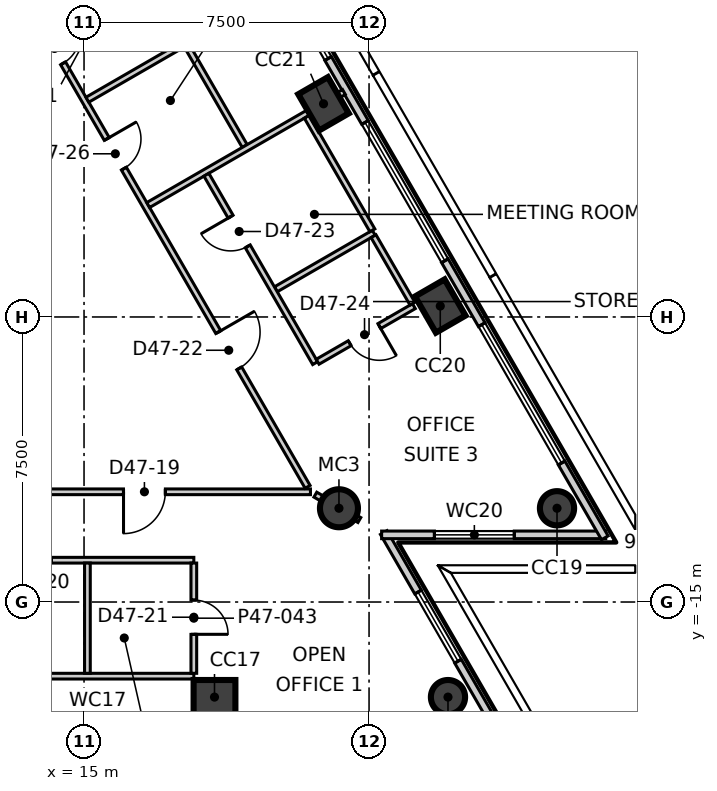
"""IFC4 building model, lengths in metres.
Left out: names, types, materials, properties, quantities, classifications, styles, units other than length and angle.
Written with IfcOpenShell. Run it as: python <this file> out.ifc"""

import sys

from ifc_helpers import new_model, si_unit, direction, frame, frame_2d, origin, origin_2d, place, context, subcontext, project, spatial, rectangle, circle, extrude, element, fill, save


model = new_model("IFC4")
c1 = context("Model", 3, precision=1e-05, world=origin(), true_north=direction((0.0, 1.0)))
c2 = subcontext(c1, "Body", "Model", "MODEL_VIEW")
j1 = project(units=[si_unit("LENGTHUNIT", "METRE"), si_unit("PLANEANGLEUNIT", "RADIAN")], contexts=[c1])
p1 = place(None, origin())
s1 = spatial("IfcSite", under=j1, at=p1, CompositionType="ELEMENT")
p2 = place(p1, origin())
s2 = spatial("IfcBuilding", under=s1, at=p2, CompositionType="ELEMENT")
p3 = place(p2, frame((0.0, 0.0, 203.3)))
s3 = spatial("IfcBuildingStorey", under=s2, at=p3, CompositionType="ELEMENT", Elevation=203.3)
p4 = place(p3, frame((18.433, -17.502, -0.3), z_axis=(0.0, 0.0, 1.0), x_axis=(1.0, 0.0, 0.0)))
e1 = element("IfcColumn", 1, at=p4, inside=s3, PredefinedType="COLUMN", context=c2, shape_type="SweptSolid", body=[
    extrude(rectangle(XDim=1.1, YDim=0.9, at=origin_2d()), origin(), (0.0, 0.0, 1.0), 4.0),
])
for number, where, z_axis, x_axis in (
    (2, (24.577, -17.502, -0.3), (0.0, 0.0, 1.0), (1.0, 0.0, 0.0)),
    (3, (27.446, -12.533, -0.3), (0.0, 0.0, 1.0), (-0.5, 0.866, 0.0)),
):
    element("IfcColumn", number, at=place(p3, frame(where, z_axis=z_axis, x_axis=x_axis)), inside=s3, PredefinedType="COLUMN", context=c2, shape_type="SweptSolid", body=[
        extrude(circle(Radius=0.45, at=origin_2d()), origin(), (0.0, 0.0, 1.0), 4.0),
    ])
for number, where, z_axis, x_axis in (
    (4, (24.374, -7.212, -0.3), (0.0, 0.0, 1.0), (-0.5, 0.866, 0.0)),
    (5, (21.302, -1.891, -0.3), (0.0, 0.0, 1.0), (-0.5, 0.866, 0.0)),
):
    element("IfcColumn", number, at=place(p3, frame(where, z_axis=z_axis, x_axis=x_axis)), inside=s3, PredefinedType="COLUMN", context=c2, shape_type="SweptSolid", body=[
        extrude(rectangle(XDim=1.1, YDim=0.9, at=origin_2d()), origin(), (0.0, 0.0, 1.0), 4.0),
    ])
p5 = place(p3, frame((21.708, -12.533, -0.3), z_axis=(0.0, 0.0, 1.0), x_axis=(1.0, 0.0, 0.0)))
e6 = element("IfcColumn", 6, at=p5, inside=s3, PredefinedType="COLUMN", context=c2, shape_type="SweptSolid", body=[
    extrude(circle(Radius=0.5, at=origin_2d()), origin(), (0.0, 0.0, 1.0), 4.0),
])
p6 = place(p3, frame((25.835, -18.28, 0.0), z_axis=(0.0, 0.0, 1.0), x_axis=(-0.499989993172, 0.866031181152, 0.0)))
e7 = element("IfcWall", 7, at=p6, inside=s3, PredefinedType="ELEMENTEDWALL", context=c2, shape_type="SweptSolid", body=[
    extrude(rectangle(XDim=5.898, YDim=0.2, at=frame_2d((2.949, 0.0))), origin(), (0.0, 0.0, 1.0), 3.7),
])
p7 = place(p6, frame((1.99, 0.0, 0.9)))
e8 = element("IfcOpeningElement", 8, at=p7, cuts=e7, PredefinedType="OPENING", context=c2, shape_type="SweptSolid", body=[
    extrude(rectangle(XDim=2.1, YDim=2.5, at=frame_2d((1.05, 1.25))), frame((0.0, 0.11, 0.0), z_axis=(0.0, -1.0, 0.0), x_axis=(1.0, 0.0, 0.0)), (0.0, 0.0, 1.0), 0.22),
])
p8 = place(p3, frame((22.831, -13.233, 0.0), z_axis=(0.0, 0.0, 1.0), x_axis=(1.0, 0.0, 0.0)))
e9 = element("IfcWall", 9, at=p8, inside=s3, PredefinedType="ELEMENTEDWALL", context=c2, shape_type="SweptSolid", body=[
    extrude(rectangle(XDim=5.898, YDim=0.2, at=frame_2d((2.949, 0.0))), origin(), (0.0, 0.0, 1.0), 3.7),
])
p9 = place(p8, frame((1.39, 0.0, 0.9)))
e10 = element("IfcOpeningElement", 10, at=p9, cuts=e9, PredefinedType="OPENING", context=c2, shape_type="SweptSolid", body=[
    extrude(rectangle(XDim=2.1, YDim=2.5, at=frame_2d((1.05, 1.25))), frame((0.0, 0.11, 0.0), z_axis=(0.0, -1.0, 0.0), x_axis=(1.0, 0.0, 0.0)), (0.0, 0.0, 1.0), 0.22),
])
p10 = place(p3, frame((28.704, -13.311, 0.0), z_axis=(0.0, 0.0, 1.0), x_axis=(-0.500010281129, 0.866019467891, 0.0)))
e11 = element("IfcWall", 11, at=p10, inside=s3, PredefinedType="ELEMENTEDWALL", context=c2, shape_type="SweptSolid", body=[
    extrude(rectangle(XDim=51.739, YDim=0.2, at=frame_2d((25.87, 0.0))), origin(), (0.0, 0.0, 1.0), 3.7),
])
p11 = place(p10, frame((2.275, 0.0, 0.9)))
e12 = element("IfcOpeningElement", 12, at=p11, cuts=e11, PredefinedType="OPENING", context=c2, shape_type="SweptSolid", body=[
    extrude(rectangle(XDim=4.2, YDim=2.5, at=frame_2d((2.1, 1.25))), frame((0.0, 0.11, 0.0), z_axis=(0.0, -1.0, 0.0), x_axis=(1.0, 0.0, 0.0)), (0.0, 0.0, 1.0), 0.22),
])
p12 = place(p10, frame((8.419, 0.0, 0.9)))
e13 = element("IfcOpeningElement", 13, at=p12, cuts=e11, PredefinedType="OPENING", context=c2, shape_type="SweptSolid", body=[
    extrude(rectangle(XDim=4.2, YDim=2.5, at=frame_2d((2.1, 1.25))), frame((0.0, 0.11, 0.0), z_axis=(0.0, -1.0, 0.0), x_axis=(1.0, 0.0, 0.0)), (0.0, 0.0, 1.0), 0.22),
])
p13 = place(p10, frame((14.563, 0.0, 0.9)))
e14 = element("IfcOpeningElement", 14, at=p13, cuts=e11, PredefinedType="OPENING", context=c2, shape_type="SweptSolid", body=[
    extrude(rectangle(XDim=4.2, YDim=2.5, at=frame_2d((2.1, 1.25))), frame((0.0, 0.11, 0.0), z_axis=(0.0, -1.0, 0.0), x_axis=(1.0, 0.0, 0.0)), (0.0, 0.0, 1.0), 0.22),
])
p14 = place(p10, frame((20.707, 0.0, 0.9)))
e15 = element("IfcOpeningElement", 15, at=p14, cuts=e11, PredefinedType="OPENING", context=c2, shape_type="SweptSolid", body=[
    extrude(rectangle(XDim=4.2, YDim=2.5, at=frame_2d((2.1, 1.25))), frame((0.0, 0.11, 0.0), z_axis=(0.0, -1.0, 0.0), x_axis=(1.0, 0.0, 0.0)), (0.0, 0.0, 1.0), 0.22),
])
p15 = place(p10, frame((26.852, 0.0, 0.9)))
e16 = element("IfcOpeningElement", 16, at=p15, cuts=e11, PredefinedType="OPENING", context=c2, shape_type="SweptSolid", body=[
    extrude(rectangle(XDim=4.2, YDim=2.5, at=frame_2d((2.1, 1.25))), frame((0.0, 0.11, 0.0), z_axis=(0.0, -1.0, 0.0), x_axis=(1.0, 0.0, 0.0)), (0.0, 0.0, 1.0), 0.22),
])
p16 = place(p10, frame((32.996, 0.0, 0.9)))
e17 = element("IfcOpeningElement", 17, at=p16, cuts=e11, PredefinedType="OPENING", context=c2, shape_type="SweptSolid", body=[
    extrude(rectangle(XDim=4.2, YDim=2.5, at=frame_2d((2.1, 1.25))), frame((0.0, 0.11, 0.0), z_axis=(0.0, -1.0, 0.0), x_axis=(1.0, 0.0, 0.0)), (0.0, 0.0, 1.0), 0.22),
])
p17 = place(p10, frame((39.14, 0.0, 0.9)))
e18 = element("IfcOpeningElement", 18, at=p17, cuts=e11, PredefinedType="OPENING", context=c2, shape_type="SweptSolid", body=[
    extrude(rectangle(XDim=4.2, YDim=2.5, at=frame_2d((2.1, 1.25))), frame((0.0, 0.11, 0.0), z_axis=(0.0, -1.0, 0.0), x_axis=(1.0, 0.0, 0.0)), (0.0, 0.0, 1.0), 0.22),
])
p18 = place(p10, frame((45.284, 0.0, 0.9)))
e19 = element("IfcOpeningElement", 19, at=p18, cuts=e11, PredefinedType="OPENING", context=c2, shape_type="SweptSolid", body=[
    extrude(rectangle(XDim=4.2, YDim=2.5, at=frame_2d((2.1, 1.25))), frame((0.0, 0.11, 0.0), z_axis=(0.0, -1.0, 0.0), x_axis=(1.0, 0.0, 0.0)), (0.0, 0.0, 1.0), 0.22),
])
p19 = place(p3, frame((-20.808, -12.1, 0.0), z_axis=(0.0, 0.0, 1.0), x_axis=(1.0, 0.0, 0.0)))
e20 = element("IfcWall", 20, at=p19, inside=s3, PredefinedType="PARTITIONING", context=c2, shape_type="SweptSolid", body=[
    extrude(rectangle(XDim=41.766, YDim=0.15, at=frame_2d((20.883, 0.0))), origin(), (0.0, 0.0, 1.0), 3.7),
])
p20 = place(p19, frame((3.6, 0.0, 0.0)))
e21 = element("IfcOpeningElement", 21, at=p20, cuts=e20, PredefinedType="OPENING", context=c2, shape_type="SweptSolid", body=[
    extrude(rectangle(XDim=1.1, YDim=2.1, at=frame_2d((0.55, 1.05))), frame((0.0, 0.085, 0.0), z_axis=(0.0, -1.0, 0.0), x_axis=(1.0, 0.0, 0.0)), (0.0, 0.0, 1.0), 0.17),
])
p21 = place(p19, frame((17.07, 0.0, 0.0)))
e22 = element("IfcOpeningElement", 22, at=p21, cuts=e20, PredefinedType="OPENING", context=c2, shape_type="SweptSolid", body=[
    extrude(rectangle(XDim=1.1, YDim=2.1, at=frame_2d((0.55, 1.05))), frame((0.0, 0.085, 0.0), z_axis=(0.0, -1.0, 0.0), x_axis=(1.0, 0.0, 0.0)), (0.0, 0.0, 1.0), 0.17),
])
p22 = place(p19, frame((9.87, 0.0, 0.0)))
e23 = element("IfcOpeningElement", 23, at=p22, cuts=e20, PredefinedType="OPENING", context=c2, shape_type="SweptSolid", body=[
    extrude(rectangle(XDim=0.9, YDim=2.1, at=frame_2d((0.45, 1.05))), frame((0.0, 0.085, 0.0), z_axis=(0.0, -1.0, 0.0), x_axis=(1.0, 0.0, 0.0)), (0.0, 0.0, 1.0), 0.17),
])
p23 = place(p19, frame((12.87, 0.0, 0.0)))
e24 = element("IfcOpeningElement", 24, at=p23, cuts=e20, PredefinedType="OPENING", context=c2, shape_type="SweptSolid", body=[
    extrude(rectangle(XDim=0.9, YDim=2.1, at=frame_2d((0.45, 1.05))), frame((0.0, 0.085, 0.0), z_axis=(0.0, -1.0, 0.0), x_axis=(1.0, 0.0, 0.0)), (0.0, 0.0, 1.0), 0.17),
])
p24 = place(p19, frame((27.658, 0.0, 0.0)))
e25 = element("IfcOpeningElement", 25, at=p24, cuts=e20, PredefinedType="OPENING", context=c2, shape_type="SweptSolid", body=[
    extrude(rectangle(XDim=1.0, YDim=2.1, at=frame_2d((0.5, 1.05))), frame((0.0, 0.085, 0.0), z_axis=(0.0, -1.0, 0.0), x_axis=(1.0, 0.0, 0.0)), (0.0, 0.0, 1.0), 0.17),
])
p25 = place(p19, frame((21.558, 0.0, 0.0)))
e26 = element("IfcOpeningElement", 26, at=p25, cuts=e20, PredefinedType="OPENING", context=c2, shape_type="SweptSolid", body=[
    extrude(rectangle(XDim=0.9, YDim=2.1, at=frame_2d((0.45, 1.05))), frame((0.0, 0.085, 0.0), z_axis=(0.0, -1.0, 0.0), x_axis=(1.0, 0.0, 0.0)), (0.0, 0.0, 1.0), 0.17),
])
p26 = place(p19, frame((36.847, 0.0, 0.0)))
e27 = element("IfcOpeningElement", 27, at=p26, cuts=e20, PredefinedType="OPENING", context=c2, shape_type="SweptSolid", body=[
    extrude(rectangle(XDim=1.1, YDim=2.1, at=frame_2d((0.55, 1.05))), frame((0.0, 0.085, 0.0), z_axis=(0.0, -1.0, 0.0), x_axis=(1.0, 0.0, 0.0)), (0.0, 0.0, 1.0), 0.17),
])
p27 = place(p3, frame((21.087, -12.175, 0.0), z_axis=(0.0, 0.0, 1.0), x_axis=(0.8662585361, -0.499595985407, 0.0)))
e28 = element("IfcWall", 28, at=p27, inside=s3, PredefinedType="PARTITIONING", context=c2, shape_type="SweptSolid", body=[
    extrude(rectangle(XDim=1.337, YDim=0.15, at=frame_2d((0.668, 0.0))), origin(), (0.0, 0.0, 1.0), 3.2),
])
p28 = place(p3, frame((0.075, 24.07, 0.0), z_axis=(0.0, 0.0, 1.0), x_axis=(0.500006834213, -0.866021458014, 0.0)))
e29 = element("IfcWall", 29, at=p28, inside=s3, PredefinedType="PARTITIONING", context=c2, shape_type="SweptSolid", body=[
    extrude(rectangle(XDim=41.616, YDim=0.15, at=frame_2d((20.808, 0.0))), origin(), (0.0, 0.0, 1.0), 3.7),
])
p29 = place(p28, frame((36.915, 0.0, 0.0)))
e30 = element("IfcOpeningElement", 30, at=p29, cuts=e29, PredefinedType="OPENING", context=c2, shape_type="SweptSolid", body=[
    extrude(rectangle(XDim=1.1, YDim=2.1, at=frame_2d((0.55, 1.05))), frame((0.0, 0.085, 0.0), z_axis=(0.0, -1.0, 0.0), x_axis=(1.0, 0.0, 0.0)), (0.0, 0.0, 1.0), 0.17),
])
p30 = place(p28, frame((22.046, 0.0, 0.0)))
e31 = element("IfcOpeningElement", 31, at=p30, cuts=e29, PredefinedType="OPENING", context=c2, shape_type="SweptSolid", body=[
    extrude(rectangle(XDim=1.1, YDim=2.1, at=frame_2d((0.55, 1.05))), frame((0.0, 0.085, 0.0), z_axis=(0.0, -1.0, 0.0), x_axis=(1.0, 0.0, 0.0)), (0.0, 0.0, 1.0), 0.17),
])
p31 = place(p28, frame((31.046, 0.0, 0.0)))
e32 = element("IfcOpeningElement", 32, at=p31, cuts=e29, PredefinedType="OPENING", context=c2, shape_type="SweptSolid", body=[
    extrude(rectangle(XDim=0.9, YDim=2.1, at=frame_2d((0.45, 1.05))), frame((0.0, 0.085, 0.0), z_axis=(0.0, -1.0, 0.0), x_axis=(1.0, 0.0, 0.0)), (0.0, 0.0, 1.0), 0.17),
])
p32 = place(p28, frame((27.846, 0.0, 0.0)))
e33 = element("IfcOpeningElement", 33, at=p32, cuts=e29, PredefinedType="OPENING", context=c2, shape_type="SweptSolid", body=[
    extrude(rectangle(XDim=0.9, YDim=2.1, at=frame_2d((0.45, 1.05))), frame((0.0, 0.085, 0.0), z_axis=(0.0, -1.0, 0.0), x_axis=(1.0, 0.0, 0.0)), (0.0, 0.0, 1.0), 0.17),
])
p33 = place(p28, frame((24.946, 0.0, 0.0)))
e34 = element("IfcOpeningElement", 34, at=p33, cuts=e29, PredefinedType="OPENING", context=c2, shape_type="SweptSolid", body=[
    extrude(rectangle(XDim=1.0, YDim=2.1, at=frame_2d((0.5, 1.05))), frame((0.0, 0.085, 0.0), z_axis=(0.0, -1.0, 0.0), x_axis=(1.0, 0.0, 0.0)), (0.0, 0.0, 1.0), 0.17),
])
p34 = place(p28, frame((17.258, 0.0, 0.0)))
e35 = element("IfcOpeningElement", 35, at=p34, cuts=e29, PredefinedType="OPENING", context=c2, shape_type="SweptSolid", body=[
    extrude(rectangle(XDim=1.0, YDim=2.1, at=frame_2d((0.5, 1.05))), frame((0.0, 0.085, 0.0), z_axis=(0.0, -1.0, 0.0), x_axis=(1.0, 0.0, 0.0)), (0.0, 0.0, 1.0), 0.17),
])
p35 = place(p28, frame((11.114, 0.0, 0.0)))
e36 = element("IfcOpeningElement", 36, at=p35, cuts=e29, PredefinedType="OPENING", context=c2, shape_type="SweptSolid", body=[
    extrude(rectangle(XDim=1.0, YDim=2.1, at=frame_2d((0.5, 1.05))), frame((0.0, 0.085, 0.0), z_axis=(0.0, -1.0, 0.0), x_axis=(1.0, 0.0, 0.0)), (0.0, 0.0, 1.0), 0.17),
])
p36 = place(p28, frame((3.669, 0.0, 0.0)))
e37 = element("IfcOpeningElement", 37, at=p36, cuts=e29, PredefinedType="OPENING", context=c2, shape_type="SweptSolid", body=[
    extrude(rectangle(XDim=1.0, YDim=2.1, at=frame_2d((0.5, 1.05))), frame((0.0, 0.085, 0.0), z_axis=(0.0, -1.0, 0.0), x_axis=(1.0, 0.0, 0.0)), (0.0, 0.0, 1.0), 0.17),
])
p37 = place(p3, frame((14.865, 4.554, 0.0), z_axis=(0.0, 0.0, 1.0), x_axis=(0.500054279689, -0.865994063124, 0.0)))
e38 = element("IfcWall", 38, at=p37, inside=s3, PredefinedType="PARTITIONING", context=c2, shape_type="SweptSolid", body=[
    extrude(rectangle(XDim=8.725, YDim=0.15, at=frame_2d((4.363, 0.0))), origin(), (0.0, 0.0, 1.0), 3.7),
])
p38 = place(p3, frame((15.088, -1.784, 0.0), z_axis=(0.0, 0.0, 1.0), x_axis=(0.866034280428, 0.499984624887, 0.0)))
e39 = element("IfcWall", 39, at=p38, inside=s3, PredefinedType="PARTITIONING", context=c2, shape_type="SweptSolid", body=[
    extrude(rectangle(XDim=2.902, YDim=0.15, at=frame_2d((1.451, 0.0))), origin(), (0.0, 0.0, 1.0), 3.7),
])
p39 = place(p3, frame((16.688, -4.555, 0.0), z_axis=(0.0, 0.0, 1.0), x_axis=(0.866034527326, 0.49998419723, 0.0)))
e40 = element("IfcWall", 40, at=p39, inside=s3, PredefinedType="PARTITIONING", context=c2, shape_type="SweptSolid", body=[
    extrude(rectangle(XDim=5.948, YDim=0.15, at=frame_2d((2.974, 0.0))), origin(), (0.0, 0.0, 1.0), 3.7),
])
p40 = place(p3, frame((12.364, -13.9, 0.0), z_axis=(0.0, 0.0, 1.0), x_axis=(1.0, 0.0, 0.0)))
e41 = element("IfcWall", 41, at=p40, inside=s3, PredefinedType="PARTITIONING", context=c2, shape_type="SweptSolid", body=[
    extrude(rectangle(XDim=5.525, YDim=0.15, at=frame_2d((2.762, 0.0))), origin(), (0.0, 0.0, 1.0), 3.7),
])
p41 = place(p40, frame((0.875, 0.0, 0.0)))
e42 = element("IfcOpeningElement", 42, at=p41, cuts=e41, PredefinedType="OPENING", context=c2, shape_type="SweptSolid", body=[
    extrude(rectangle(XDim=0.9, YDim=2.1, at=frame_2d((0.45, 1.05))), frame((0.0, 0.085, 0.0), z_axis=(0.0, -1.0, 0.0), x_axis=(1.0, 0.0, 0.0)), (0.0, 0.0, 1.0), 0.17),
])
p42 = place(p3, frame((12.364, -16.951, 0.0), z_axis=(0.0, 0.0, 1.0), x_axis=(1.0, 0.0, 0.0)))
e43 = element("IfcWall", 43, at=p42, inside=s3, PredefinedType="PARTITIONING", context=c2, shape_type="SweptSolid", body=[
    extrude(rectangle(XDim=5.525, YDim=0.15, at=frame_2d((2.762, 0.0))), origin(), (0.0, 0.0, 1.0), 3.7),
])
p43 = place(p3, frame((17.889, -16.876, 0.0), z_axis=(0.0, 0.0, 1.0), x_axis=(0.0, 1.0, 0.0)))
e44 = element("IfcWall", 44, at=p43, inside=s3, PredefinedType="PARTITIONING", context=c2, shape_type="SweptSolid", body=[
    extrude(rectangle(XDim=2.901, YDim=0.15, at=frame_2d((1.45, 0.0))), origin(), (0.0, 0.0, 1.0), 3.7),
])
p44 = place(p43, frame((1.026, 0.0, 0.0)))
e45 = element("IfcOpeningElement", 45, at=p44, cuts=e44, PredefinedType="OPENING", context=c2, shape_type="SweptSolid", body=[
    extrude(rectangle(XDim=0.9, YDim=2.1, at=frame_2d((0.45, 1.05))), frame((0.0, 0.085, 0.0), z_axis=(0.0, -1.0, 0.0), x_axis=(1.0, 0.0, 0.0)), (0.0, 0.0, 1.0), 0.17),
])
p45 = place(p3, frame((15.089, -16.876, 0.0), z_axis=(0.0, 0.0, 1.0), x_axis=(0.0, 1.0, 0.0)))
e46 = element("IfcWall", 46, at=p45, inside=s3, PredefinedType="PARTITIONING", context=c2, shape_type="SweptSolid", body=[
    extrude(rectangle(XDim=2.901, YDim=0.15, at=frame_2d((1.45, 0.0))), origin(), (0.0, 0.0, 1.0), 3.7),
])
p46 = place(p3, frame((20.047, -6.772, 0.0), z_axis=(0.0, 0.0, 1.0), x_axis=(0.865987462095, 0.500065711177, 0.0)))
e47 = element("IfcWall", 47, at=p46, inside=s3, PredefinedType="PARTITIONING", context=c2, shape_type="SweptSolid", body=[
    extrude(rectangle(XDim=2.976, YDim=0.15, at=frame_2d((1.488, 0.0))), origin(), (0.0, 0.0, 1.0), 3.7),
])
p47 = place(p3, frame((20.862, -2.232, 0.0), z_axis=(0.0, 0.0, 1.0), x_axis=(0.499936846106, -0.866061862632, 0.0)))
e48 = element("IfcWall", 48, at=p47, inside=s3, PredefinedType="PARTITIONING", context=c2, shape_type="SweptSolid", body=[
    extrude(rectangle(XDim=3.45, YDim=0.15, at=frame_2d((1.725, 0.0))), origin(), (0.0, 0.0, 1.0), 3.7),
])
p48 = place(p3, frame((18.22, -3.757, 0.0), z_axis=(0.0, 0.0, 1.0), x_axis=(0.499941490393, -0.866059181686, 0.0)))
e49 = element("IfcWall", 49, at=p48, inside=s3, PredefinedType="PARTITIONING", context=c2, shape_type="SweptSolid", body=[
    extrude(rectangle(XDim=5.725, YDim=0.15, at=frame_2d((2.862, 0.0))), origin(), (0.0, 0.0, 1.0), 3.7),
])
p49 = place(p48, frame((1.275, 0.0, 0.0)))
e50 = element("IfcOpeningElement", 50, at=p49, cuts=e49, PredefinedType="OPENING", context=c2, shape_type="SweptSolid", body=[
    extrude(rectangle(XDim=0.9, YDim=2.1, at=frame_2d((0.45, 1.05))), frame((0.0, 0.085, 0.0), z_axis=(0.0, -1.0, 0.0), x_axis=(1.0, 0.0, 0.0)), (0.0, 0.0, 1.0), 0.17),
])
p50 = place(p3, frame((21.147, -8.678, 0.0), z_axis=(0.0, 0.0, 1.0), x_axis=(0.865953438489, 0.500124626836, 0.0)))
e51 = element("IfcWall", 51, at=p50, inside=s3, PredefinedType="PARTITIONING", context=c2, shape_type="SweptSolid", body=[
    extrude(rectangle(XDim=2.925, YDim=0.15, at=frame_2d((1.462, 0.0))), origin(), (0.0, 0.0, 1.0), 3.7),
])
p51 = place(p50, frame((0.975, 0.0, 0.0)))
e52 = element("IfcOpeningElement", 52, at=p51, cuts=e51, PredefinedType="OPENING", context=c2, shape_type="SweptSolid", body=[
    extrude(rectangle(XDim=0.9, YDim=2.1, at=frame_2d((0.45, 1.05))), frame((0.0, 0.085, 0.0), z_axis=(0.0, -1.0, 0.0), x_axis=(1.0, 0.0, 0.0)), (0.0, 0.0, 1.0), 0.17),
])
p52 = place(p3, frame((22.618, -5.375, 0.0), z_axis=(0.0, 0.0, 1.0), x_axis=(0.50014860279, -0.865939590923, 0.0)))
e53 = element("IfcWall", 53, at=p52, inside=s3, PredefinedType="PARTITIONING", context=c2, shape_type="SweptSolid", body=[
    extrude(rectangle(XDim=2.05, YDim=0.15, at=frame_2d((1.025, 0.0))), origin(), (0.0, 0.0, 1.0), 3.7),
])
p53 = place(p7, origin())
e54 = element("IfcWindow", 54, at=p53, inside=s3, PartitioningType="SINGLE_PANEL", PredefinedType="WINDOW", context=c2, shape_type="SweptSolid", body=[
    extrude(rectangle(XDim=2.1, YDim=2.5, at=frame_2d((1.05, 1.25))), frame((0.0, 0.03, 0.0), z_axis=(0.0, -1.0, 0.0), x_axis=(1.0, 0.0, 0.0)), (0.0, 0.0, 1.0), 0.06),
])
fill(e8, e54)
p54 = place(p9, origin())
e55 = element("IfcWindow", 55, at=p54, inside=s3, PartitioningType="SINGLE_PANEL", PredefinedType="WINDOW", context=c2, shape_type="SweptSolid", body=[
    extrude(rectangle(XDim=2.1, YDim=2.5, at=frame_2d((1.05, 1.25))), frame((0.0, 0.03, 0.0), z_axis=(0.0, -1.0, 0.0), x_axis=(1.0, 0.0, 0.0)), (0.0, 0.0, 1.0), 0.06),
])
fill(e10, e55)
p55 = place(p11, origin())
e56 = element("IfcWindow", 56, at=p55, inside=s3, PartitioningType="SINGLE_PANEL", PredefinedType="WINDOW", context=c2, shape_type="SweptSolid", body=[
    extrude(rectangle(XDim=4.2, YDim=2.5, at=frame_2d((2.1, 1.25))), frame((0.0, 0.03, 0.0), z_axis=(0.0, -1.0, 0.0), x_axis=(1.0, 0.0, 0.0)), (0.0, 0.0, 1.0), 0.06),
])
fill(e12, e56)
p56 = place(p12, origin())
e57 = element("IfcWindow", 57, at=p56, inside=s3, PartitioningType="SINGLE_PANEL", PredefinedType="WINDOW", context=c2, shape_type="SweptSolid", body=[
    extrude(rectangle(XDim=4.2, YDim=2.5, at=frame_2d((2.1, 1.25))), frame((0.0, 0.03, 0.0), z_axis=(0.0, -1.0, 0.0), x_axis=(1.0, 0.0, 0.0)), (0.0, 0.0, 1.0), 0.06),
])
fill(e13, e57)
p57 = place(p13, origin())
e58 = element("IfcWindow", 58, at=p57, inside=s3, PartitioningType="SINGLE_PANEL", PredefinedType="WINDOW", context=c2, shape_type="SweptSolid", body=[
    extrude(rectangle(XDim=4.2, YDim=2.5, at=frame_2d((2.1, 1.25))), frame((0.0, 0.03, 0.0), z_axis=(0.0, -1.0, 0.0), x_axis=(1.0, 0.0, 0.0)), (0.0, 0.0, 1.0), 0.06),
])
fill(e14, e58)
p58 = place(p26, origin())
e59 = element("IfcDoor", 59, at=p58, inside=s3, OperationType="SINGLE_SWING_LEFT", PredefinedType="DOOR", context=c2, shape_type="SweptSolid", body=[
    extrude(rectangle(XDim=1.1, YDim=2.1, at=frame_2d((0.55, 1.05))), frame((0.0, 0.025, 0.0), z_axis=(0.0, -1.0, 0.0), x_axis=(1.0, 0.0, 0.0)), (0.0, 0.0, 1.0), 0.05),
])
fill(e27, e59)
p59 = place(p44, origin())
e60 = element("IfcDoor", 60, at=p59, inside=s3, OperationType="SINGLE_SWING_LEFT", PredefinedType="DOOR", context=c2, shape_type="SweptSolid", body=[
    extrude(rectangle(XDim=0.9, YDim=2.1, at=frame_2d((0.45, 1.05))), frame((0.0, 0.025, 0.0), z_axis=(0.0, -1.0, 0.0), x_axis=(1.0, 0.0, 0.0)), (0.0, 0.0, 1.0), 0.05),
])
fill(e45, e60)
p60 = place(p29, origin())
e61 = element("IfcDoor", 61, at=p60, inside=s3, OperationType="SINGLE_SWING_RIGHT", PredefinedType="DOOR", context=c2, shape_type="SweptSolid", body=[
    extrude(rectangle(XDim=1.1, YDim=2.1, at=frame_2d((0.55, 1.05))), frame((0.0, 0.025, 0.0), z_axis=(0.0, -1.0, 0.0), x_axis=(1.0, 0.0, 0.0)), (0.0, 0.0, 1.0), 0.05),
])
fill(e30, e61)
p61 = place(p49, origin())
e62 = element("IfcDoor", 62, at=p61, inside=s3, OperationType="SINGLE_SWING_LEFT", PredefinedType="DOOR", context=c2, shape_type="SweptSolid", body=[
    extrude(rectangle(XDim=0.9, YDim=2.1, at=frame_2d((0.45, 1.05))), frame((0.0, 0.025, 0.0), z_axis=(0.0, -1.0, 0.0), x_axis=(1.0, 0.0, 0.0)), (0.0, 0.0, 1.0), 0.05),
])
fill(e50, e62)
p62 = place(p51, origin())
e63 = element("IfcDoor", 63, at=p62, inside=s3, OperationType="SINGLE_SWING_RIGHT", PredefinedType="DOOR", context=c2, shape_type="SweptSolid", body=[
    extrude(rectangle(XDim=0.9, YDim=2.1, at=frame_2d((0.45, 1.05))), frame((0.0, 0.025, 0.0), z_axis=(0.0, -1.0, 0.0), x_axis=(1.0, 0.0, 0.0)), (0.0, 0.0, 1.0), 0.05),
])
fill(e52, e63)
p63 = place(p31, origin())
e64 = element("IfcDoor", 64, at=p63, inside=s3, OperationType="SINGLE_SWING_RIGHT", PredefinedType="DOOR", context=c2, shape_type="SweptSolid", body=[
    extrude(rectangle(XDim=0.9, YDim=2.1, at=frame_2d((0.45, 1.05))), frame((0.0, 0.025, 0.0), z_axis=(0.0, -1.0, 0.0), x_axis=(1.0, 0.0, 0.0)), (0.0, 0.0, 1.0), 0.05),
])
fill(e32, e64)
p64 = place(p32, origin())
e65 = element("IfcDoor", 65, at=p64, inside=s3, OperationType="SINGLE_SWING_RIGHT", PredefinedType="DOOR", context=c2, shape_type="SweptSolid", body=[
    extrude(rectangle(XDim=0.9, YDim=2.1, at=frame_2d((0.45, 1.05))), frame((0.0, 0.025, 0.0), z_axis=(0.0, -1.0, 0.0), x_axis=(1.0, 0.0, 0.0)), (0.0, 0.0, 1.0), 0.05),
])
fill(e33, e65)
save(model, sys.argv[1])
